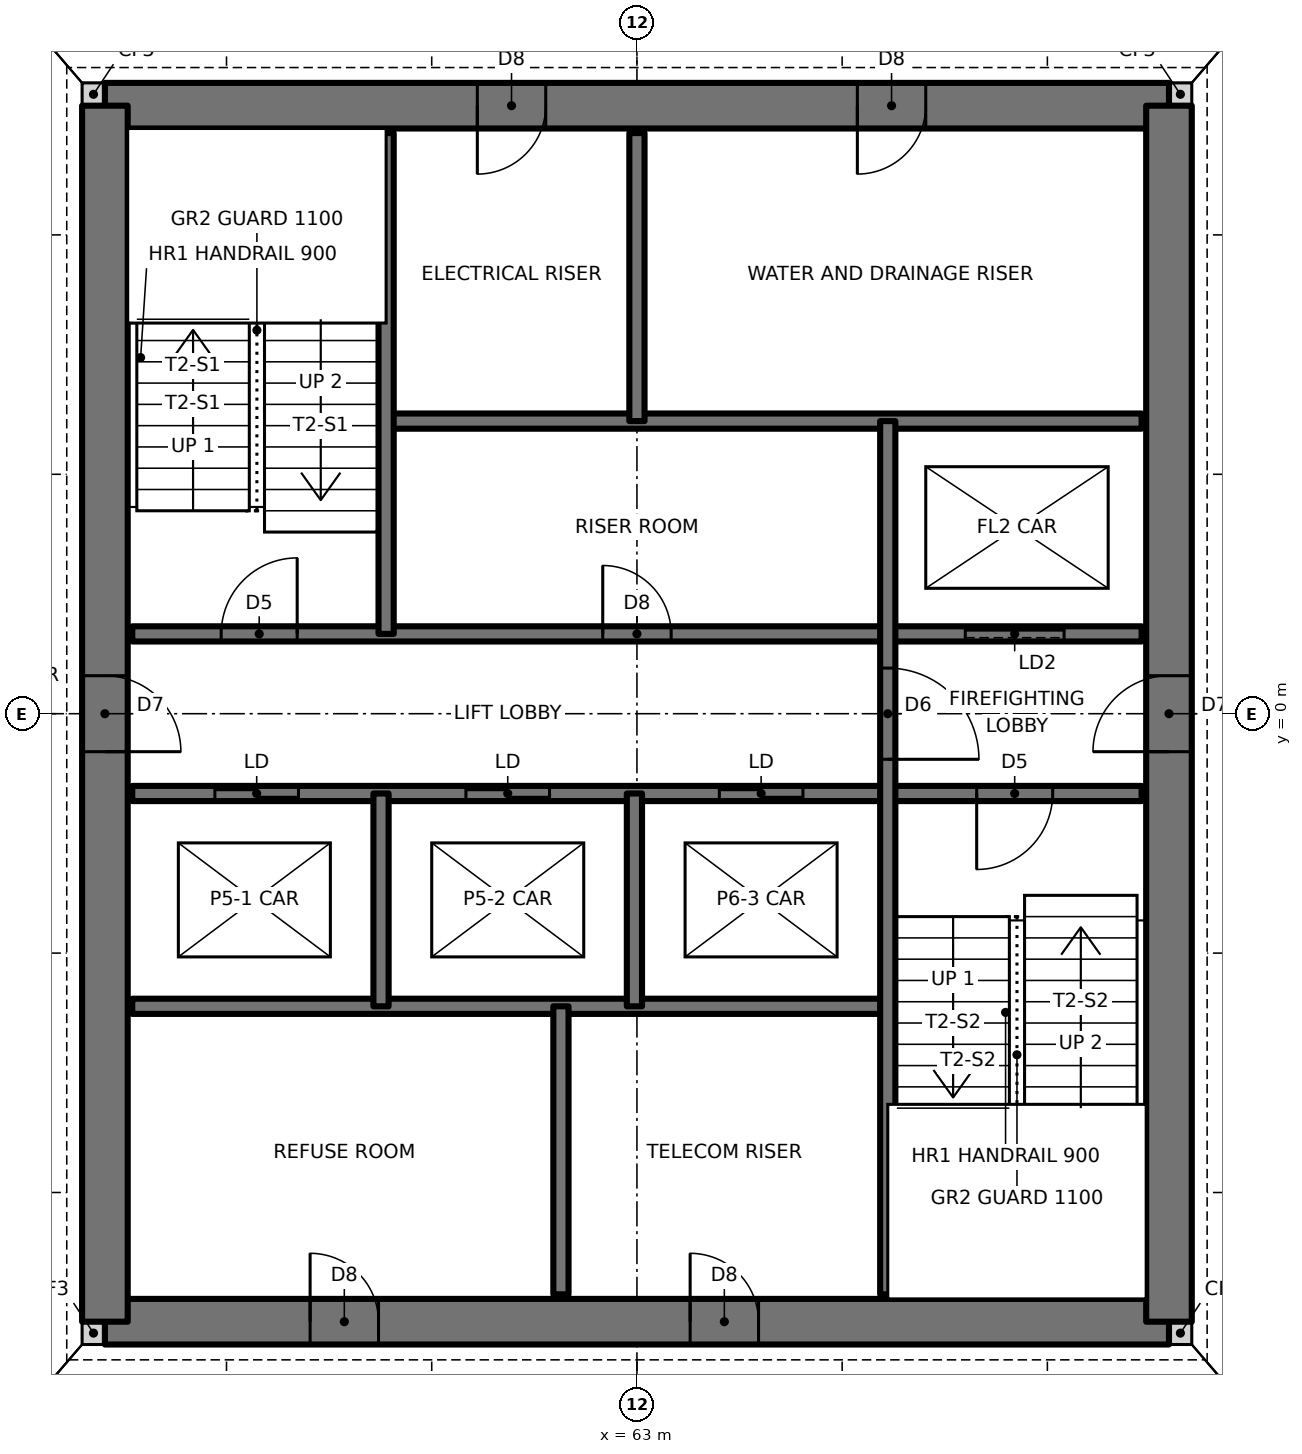
"""IFC4 building model, lengths in metres.
Left out: names, types, materials, properties, quantities, classifications, styles, units other than length and angle.
Written with IfcOpenShell. Run it as: python <this file> out.ifc"""

import sys

from ifc_helpers import new_model, si_unit, direction, frame, frame_2d, origin, place, context, subcontext, project, spatial, rectangle, extrude, element, fill, save


model = new_model("IFC4")
c1 = context("Model", 3, precision=1e-05, world=origin(), true_north=direction((0.0, 1.0)))
c2 = subcontext(c1, "Body", "Model", "MODEL_VIEW")
j1 = project(units=[si_unit("LENGTHUNIT", "METRE"), si_unit("PLANEANGLEUNIT", "RADIAN")], contexts=[c1])
p1 = place(None, origin())
s1 = spatial("IfcSite", under=j1, at=p1, CompositionType="ELEMENT")
p2 = place(p1, origin())
s2 = spatial("IfcBuilding", under=s1, at=p2, CompositionType="ELEMENT")
p3 = place(p2, frame((0.0, 0.0, 50.0)))
s3 = spatial("IfcBuildingStorey", under=s2, at=p3, CompositionType="ELEMENT", Elevation=50.0)
for number, where, z_axis, x_axis in (
    (1, (55.7, -8.15, 0.0), (0.0, 0.0, 1.0), (1.0, 0.0, 0.0)),
    (2, (70.0, -8.15, 0.0), (0.0, 0.0, 1.0), (1.0, 0.0, 0.0)),
    (3, (70.0, 8.15, 0.0), (0.0, 0.0, 1.0), (1.0, 0.0, 0.0)),
    (4, (55.7, 8.15, 0.0), (0.0, 0.0, 1.0), (1.0, 0.0, 0.0)),
):
    element("IfcWall", number, at=place(p3, frame(where, z_axis=z_axis, x_axis=x_axis)), inside=s3, PredefinedType="SOLIDWALL", context=c2, shape_type="SweptSolid", body=[
        extrude(rectangle(XDim=0.3, YDim=0.3, at=frame_2d((0.15, 0.0))), origin(), (0.0, 0.0, 1.0), 3.5),
    ])
p4 = place(p3, frame((56.0, -8.0, 0.0), z_axis=(0.0, 0.0, 1.0), x_axis=(1.0, 0.0, 0.0)))
e5 = element("IfcWall", 5, at=p4, inside=s3, PredefinedType="SHEAR", context=c2, shape_type="SweptSolid", body=[
    extrude(rectangle(XDim=14.0, YDim=0.6, at=frame_2d((7.0, 0.0))), origin(), (0.0, 0.0, 1.0), 3.5),
])
p5 = place(p4, frame((2.7, 0.0, 0.0)))
e6 = element("IfcOpeningElement", 6, at=p5, cuts=e5, PredefinedType="OPENING", context=c2, shape_type="SweptSolid", body=[
    extrude(rectangle(XDim=0.9, YDim=2.1, at=frame_2d((0.45, 1.05))), frame((0.0, 0.31, 0.0), z_axis=(0.0, -1.0, 0.0), x_axis=(1.0, 0.0, 0.0)), (0.0, 0.0, 1.0), 0.62),
])
p6 = place(p4, frame((7.7, 0.0, 0.0)))
e7 = element("IfcOpeningElement", 7, at=p6, cuts=e5, PredefinedType="OPENING", context=c2, shape_type="SweptSolid", body=[
    extrude(rectangle(XDim=0.9, YDim=2.1, at=frame_2d((0.45, 1.05))), frame((0.0, 0.31, 0.0), z_axis=(0.0, -1.0, 0.0), x_axis=(1.0, 0.0, 0.0)), (0.0, 0.0, 1.0), 0.62),
])
p7 = place(p3, frame((70.0, 8.0, 0.0), z_axis=(0.0, 0.0, 1.0), x_axis=(-1.0, 0.0, 0.0)))
e8 = element("IfcWall", 8, at=p7, inside=s3, PredefinedType="SHEAR", context=c2, shape_type="SweptSolid", body=[
    extrude(rectangle(XDim=14.0, YDim=0.6, at=frame_2d((7.0, 0.0))), origin(), (0.0, 0.0, 1.0), 3.5),
])
p8 = place(p7, frame((8.2, 0.0, 0.0)))
e9 = element("IfcOpeningElement", 9, at=p8, cuts=e8, PredefinedType="OPENING", context=c2, shape_type="SweptSolid", body=[
    extrude(rectangle(XDim=0.9, YDim=2.1, at=frame_2d((0.45, 1.05))), frame((0.0, 0.31, 0.0), z_axis=(0.0, -1.0, 0.0), x_axis=(1.0, 0.0, 0.0)), (0.0, 0.0, 1.0), 0.62),
])
p9 = place(p7, frame((3.2, 0.0, 0.0)))
e10 = element("IfcOpeningElement", 10, at=p9, cuts=e8, PredefinedType="OPENING", context=c2, shape_type="SweptSolid", body=[
    extrude(rectangle(XDim=0.9, YDim=2.1, at=frame_2d((0.45, 1.05))), frame((0.0, 0.31, 0.0), z_axis=(0.0, -1.0, 0.0), x_axis=(1.0, 0.0, 0.0)), (0.0, 0.0, 1.0), 0.62),
])
p10 = place(p3, frame((70.0, -8.0, 0.0), z_axis=(0.0, 0.0, 1.0), x_axis=(0.0, 1.0, 0.0)))
e11 = element("IfcWall", 11, at=p10, inside=s3, PredefinedType="SHEAR", context=c2, shape_type="SweptSolid", body=[
    extrude(rectangle(XDim=16.0, YDim=0.6, at=frame_2d((8.0, 0.0))), origin(), (0.0, 0.0, 1.0), 3.5),
])
p11 = place(p10, frame((7.5, 0.0, 0.0)))
e12 = element("IfcOpeningElement", 12, at=p11, cuts=e11, PredefinedType="OPENING", context=c2, shape_type="SweptSolid", body=[
    extrude(rectangle(XDim=1.0, YDim=2.1, at=frame_2d((0.5, 1.05))), frame((0.0, 0.31, 0.0), z_axis=(0.0, -1.0, 0.0), x_axis=(1.0, 0.0, 0.0)), (0.0, 0.0, 1.0), 0.62),
])
p12 = place(p3, frame((56.0, 8.0, 0.0), z_axis=(0.0, 0.0, 1.0), x_axis=(0.0, -1.0, 0.0)))
e13 = element("IfcWall", 13, at=p12, inside=s3, PredefinedType="SHEAR", context=c2, shape_type="SweptSolid", body=[
    extrude(rectangle(XDim=16.0, YDim=0.6, at=frame_2d((8.0, 0.0))), origin(), (0.0, 0.0, 1.0), 3.5),
])
p13 = place(p12, frame((7.5, 0.0, 0.0)))
e14 = element("IfcOpeningElement", 14, at=p13, cuts=e13, PredefinedType="OPENING", context=c2, shape_type="SweptSolid", body=[
    extrude(rectangle(XDim=1.0, YDim=2.1, at=frame_2d((0.5, 1.05))), frame((0.0, 0.31, 0.0), z_axis=(0.0, -1.0, 0.0), x_axis=(1.0, 0.0, 0.0)), (0.0, 0.0, 1.0), 0.62),
])
p14 = place(p3, frame((56.36, -3.85, 0.0), z_axis=(0.0, 0.0, 1.0), x_axis=(1.0, 0.0, 0.0)))
e15 = element("IfcWall", 15, at=p14, inside=s3, PredefinedType="SOLIDWALL", context=c2, shape_type="SweptSolid", body=[
    extrude(rectangle(XDim=9.94, YDim=0.2, at=frame_2d((4.97, 0.0))), origin(), (0.0, 0.0, 1.0), 3.5),
])
p15 = place(p3, frame((56.36, -1.05, 0.0), z_axis=(0.0, 0.0, 1.0), x_axis=(1.0, 0.0, 0.0)))
e16 = element("IfcWall", 16, at=p15, inside=s3, PredefinedType="SOLIDWALL", context=c2, shape_type="SweptSolid", body=[
    extrude(rectangle(XDim=13.28, YDim=0.2, at=frame_2d((6.64, 0.0))), origin(), (0.0, 0.0, 1.0), 3.5),
])
p16 = place(p15, frame((11.11, 0.0, 0.0)))
e17 = element("IfcOpeningElement", 17, at=p16, cuts=e16, PredefinedType="OPENING", context=c2, shape_type="SweptSolid", body=[
    extrude(rectangle(XDim=1.0, YDim=2.1, at=frame_2d((0.5, 1.05))), frame((0.0, 0.11, 0.0), z_axis=(0.0, -1.0, 0.0), x_axis=(1.0, 0.0, 0.0)), (0.0, 0.0, 1.0), 0.22),
])
p17 = place(p15, frame((1.087, 0.0, 0.0)))
e18 = element("IfcOpeningElement", 18, at=p17, cuts=e16, PredefinedType="OPENING", context=c2, shape_type="SweptSolid", body=[
    extrude(rectangle(XDim=1.1, YDim=2.1, at=frame_2d((0.55, 1.05))), frame((0.0, 0.11, 0.0), z_axis=(0.0, -1.0, 0.0), x_axis=(1.0, 0.0, 0.0)), (0.0, 0.0, 1.0), 0.22),
])
p18 = place(p15, frame((4.39, 0.0, 0.0)))
e19 = element("IfcOpeningElement", 19, at=p18, cuts=e16, PredefinedType="OPENING", context=c2, shape_type="SweptSolid", body=[
    extrude(rectangle(XDim=1.1, YDim=2.1, at=frame_2d((0.55, 1.05))), frame((0.0, 0.11, 0.0), z_axis=(0.0, -1.0, 0.0), x_axis=(1.0, 0.0, 0.0)), (0.0, 0.0, 1.0), 0.22),
])
p19 = place(p15, frame((7.724, 0.0, 0.0)))
e20 = element("IfcOpeningElement", 20, at=p19, cuts=e16, PredefinedType="OPENING", context=c2, shape_type="SweptSolid", body=[
    extrude(rectangle(XDim=1.1, YDim=2.1, at=frame_2d((0.55, 1.05))), frame((0.0, 0.11, 0.0), z_axis=(0.0, -1.0, 0.0), x_axis=(1.0, 0.0, 0.0)), (0.0, 0.0, 1.0), 0.22),
])
p20 = place(p3, frame((56.36, 1.05, 0.0), z_axis=(0.0, 0.0, 1.0), x_axis=(1.0, 0.0, 0.0)))
e21 = element("IfcWall", 21, at=p20, inside=s3, PredefinedType="SOLIDWALL", context=c2, shape_type="SweptSolid", body=[
    extrude(rectangle(XDim=13.28, YDim=0.2, at=frame_2d((6.64, 0.0))), origin(), (0.0, 0.0, 1.0), 3.5),
])
p21 = place(p20, frame((1.17, 0.0, 0.0)))
e22 = element("IfcOpeningElement", 22, at=p21, cuts=e21, PredefinedType="OPENING", context=c2, shape_type="SweptSolid", body=[
    extrude(rectangle(XDim=1.0, YDim=2.1, at=frame_2d((0.5, 1.05))), frame((0.0, 0.11, 0.0), z_axis=(0.0, -1.0, 0.0), x_axis=(1.0, 0.0, 0.0)), (0.0, 0.0, 1.0), 0.22),
])
p22 = place(p20, frame((6.19, 0.0, 0.0)))
e23 = element("IfcOpeningElement", 23, at=p22, cuts=e21, PredefinedType="OPENING", context=c2, shape_type="SweptSolid", body=[
    extrude(rectangle(XDim=0.9, YDim=2.1, at=frame_2d((0.45, 1.05))), frame((0.0, 0.11, 0.0), z_axis=(0.0, -1.0, 0.0), x_axis=(1.0, 0.0, 0.0)), (0.0, 0.0, 1.0), 0.22),
])
p23 = place(p20, frame((10.96, 0.0, 0.0)))
e24 = element("IfcOpeningElement", 24, at=p23, cuts=e21, PredefinedType="OPENING", context=c2, shape_type="SweptSolid", body=[
    extrude(rectangle(XDim=1.3, YDim=2.1, at=frame_2d((0.65, 1.05))), frame((0.0, 0.11, 0.0), z_axis=(0.0, -1.0, 0.0), x_axis=(1.0, 0.0, 0.0)), (0.0, 0.0, 1.0), 0.22),
])
p24 = place(p3, frame((59.7, 3.85, 0.0), z_axis=(0.0, 0.0, 1.0), x_axis=(1.0, 0.0, 0.0)))
e25 = element("IfcWall", 25, at=p24, inside=s3, PredefinedType="SOLIDWALL", context=c2, shape_type="SweptSolid", body=[
    extrude(rectangle(XDim=9.94, YDim=0.2, at=frame_2d((4.97, 0.0))), origin(), (0.0, 0.0, 1.0), 3.5),
])
p25 = place(p3, frame((66.3, -7.64, 0.0), z_axis=(0.0, 0.0, 1.0), x_axis=(0.0, 1.0, 0.0)))
e26 = element("IfcWall", 26, at=p25, inside=s3, PredefinedType="SOLIDWALL", context=c2, shape_type="SweptSolid", body=[
    extrude(rectangle(XDim=11.49, YDim=0.2, at=frame_2d((5.745, 0.0))), origin(), (0.0, 0.0, 1.0), 3.5),
])
p26 = place(p25, frame((7.04, 0.0, 0.0)))
e27 = element("IfcOpeningElement", 27, at=p26, cuts=e26, PredefinedType="OPENING", context=c2, shape_type="SweptSolid", body=[
    extrude(rectangle(XDim=1.2, YDim=2.1, at=frame_2d((0.6, 1.05))), frame((0.0, 0.11, 0.0), z_axis=(0.0, -1.0, 0.0), x_axis=(1.0, 0.0, 0.0)), (0.0, 0.0, 1.0), 0.22),
])
p27 = place(p3, frame((63.0, 3.85, 0.0), z_axis=(0.0, 0.0, 1.0), x_axis=(0.0, 1.0, 0.0)))
e28 = element("IfcWall", 28, at=p27, inside=s3, PredefinedType="SOLIDWALL", context=c2, shape_type="SweptSolid", body=[
    extrude(rectangle(XDim=3.79, YDim=0.2, at=frame_2d((1.895, 0.0))), origin(), (0.0, 0.0, 1.0), 3.5),
])
p28 = place(p3, frame((62.967, -3.85, 0.0), z_axis=(0.0, 0.0, 1.0), x_axis=(0.0, 1.0, 0.0)))
e29 = element("IfcWall", 29, at=p28, inside=s3, PredefinedType="SOLIDWALL", context=c2, shape_type="SweptSolid", body=[
    extrude(rectangle(XDim=2.8, YDim=0.2, at=frame_2d((1.4, 0.0))), origin(), (0.0, 0.0, 1.0), 3.5),
])
p29 = place(p3, frame((62.0, -7.64, 0.0), z_axis=(0.0, 0.0, 1.0), x_axis=(0.0, 1.0, 0.0)))
e30 = element("IfcWall", 30, at=p29, inside=s3, PredefinedType="SOLIDWALL", context=c2, shape_type="SweptSolid", body=[
    extrude(rectangle(XDim=3.79, YDim=0.2, at=frame_2d((1.895, 0.0))), origin(), (0.0, 0.0, 1.0), 3.5),
])
p30 = place(p3, frame((59.7, 1.05, 0.0), z_axis=(0.0, 0.0, 1.0), x_axis=(0.0, 1.0, 0.0)))
e31 = element("IfcWall", 31, at=p30, inside=s3, PredefinedType="SOLIDWALL", context=c2, shape_type="SweptSolid", body=[
    extrude(rectangle(XDim=6.59, YDim=0.2, at=frame_2d((3.295, 0.0))), origin(), (0.0, 0.0, 1.0), 3.5),
])
p31 = place(p3, frame((59.633, -3.85, 0.0), z_axis=(0.0, 0.0, 1.0), x_axis=(0.0, 1.0, 0.0)))
e32 = element("IfcWall", 32, at=p31, inside=s3, PredefinedType="SOLIDWALL", context=c2, shape_type="SweptSolid", body=[
    extrude(rectangle(XDim=2.8, YDim=0.2, at=frame_2d((1.4, 0.0))), origin(), (0.0, 0.0, 1.0), 3.5),
])
p32 = place(p21, origin())
e33 = element("IfcDoor", 33, at=p32, inside=s3, OperationType="SINGLE_SWING_RIGHT", PredefinedType="DOOR", context=c2, shape_type="SweptSolid", body=[
    extrude(rectangle(XDim=1.0, YDim=2.1, at=frame_2d((0.5, 1.05))), frame((0.0, 0.025, 0.0), z_axis=(0.0, -1.0, 0.0), x_axis=(1.0, 0.0, 0.0)), (0.0, 0.0, 1.0), 0.05),
])
fill(e22, e33)
p33 = place(p16, frame((1.0, 0.0, 0.0), z_axis=(0.0, 0.0, 1.0), x_axis=(-1.0, 0.0, 0.0)))
e34 = element("IfcDoor", 34, at=p33, inside=s3, OperationType="SINGLE_SWING_RIGHT", PredefinedType="DOOR", context=c2, shape_type="SweptSolid", body=[
    extrude(rectangle(XDim=1.0, YDim=2.1, at=frame_2d((0.5, 1.05))), frame((0.0, 0.025, 0.0), z_axis=(0.0, -1.0, 0.0), x_axis=(1.0, 0.0, 0.0)), (0.0, 0.0, 1.0), 0.05),
])
fill(e17, e34)
p34 = place(p26, frame((1.2, 0.0, 0.0), z_axis=(0.0, 0.0, 1.0), x_axis=(-1.0, 0.0, 0.0)))
e35 = element("IfcDoor", 35, at=p34, inside=s3, OperationType="SINGLE_SWING_RIGHT", PredefinedType="DOOR", context=c2, shape_type="SweptSolid", body=[
    extrude(rectangle(XDim=1.2, YDim=2.1, at=frame_2d((0.6, 1.05))), frame((0.0, 0.025, 0.0), z_axis=(0.0, -1.0, 0.0), x_axis=(1.0, 0.0, 0.0)), (0.0, 0.0, 1.0), 0.05),
])
fill(e27, e35)
p35 = place(p22, origin())
e36 = element("IfcDoor", 36, at=p35, inside=s3, OperationType="SINGLE_SWING_LEFT", PredefinedType="DOOR", context=c2, shape_type="SweptSolid", body=[
    extrude(rectangle(XDim=0.9, YDim=2.1, at=frame_2d((0.45, 1.05))), frame((0.0, 0.025, 0.0), z_axis=(0.0, -1.0, 0.0), x_axis=(1.0, 0.0, 0.0)), (0.0, 0.0, 1.0), 0.05),
])
fill(e23, e36)
p36 = place(p13, origin())
e37 = element("IfcDoor", 37, at=p36, inside=s3, OperationType="SINGLE_SWING_RIGHT", PredefinedType="DOOR", context=c2, shape_type="SweptSolid", body=[
    extrude(rectangle(XDim=1.0, YDim=2.1, at=frame_2d((0.5, 1.05))), frame((0.0, 0.025, 0.0), z_axis=(0.0, -1.0, 0.0), x_axis=(1.0, 0.0, 0.0)), (0.0, 0.0, 1.0), 0.05),
])
fill(e14, e37)
p37 = place(p11, origin())
e38 = element("IfcDoor", 38, at=p37, inside=s3, OperationType="SINGLE_SWING_LEFT", PredefinedType="DOOR", context=c2, shape_type="SweptSolid", body=[
    extrude(rectangle(XDim=1.0, YDim=2.1, at=frame_2d((0.5, 1.05))), frame((0.0, 0.025, 0.0), z_axis=(0.0, -1.0, 0.0), x_axis=(1.0, 0.0, 0.0)), (0.0, 0.0, 1.0), 0.05),
])
fill(e12, e38)
p38 = place(p8, origin())
e39 = element("IfcDoor", 39, at=p38, inside=s3, OperationType="SINGLE_SWING_RIGHT", PredefinedType="DOOR", context=c2, shape_type="SweptSolid", body=[
    extrude(rectangle(XDim=0.9, YDim=2.1, at=frame_2d((0.45, 1.05))), frame((0.0, 0.025, 0.0), z_axis=(0.0, -1.0, 0.0), x_axis=(1.0, 0.0, 0.0)), (0.0, 0.0, 1.0), 0.05),
])
fill(e9, e39)
p39 = place(p9, origin())
e40 = element("IfcDoor", 40, at=p39, inside=s3, OperationType="SINGLE_SWING_RIGHT", PredefinedType="DOOR", context=c2, shape_type="SweptSolid", body=[
    extrude(rectangle(XDim=0.9, YDim=2.1, at=frame_2d((0.45, 1.05))), frame((0.0, 0.025, 0.0), z_axis=(0.0, -1.0, 0.0), x_axis=(1.0, 0.0, 0.0)), (0.0, 0.0, 1.0), 0.05),
])
fill(e10, e40)
p40 = place(p5, origin())
e41 = element("IfcDoor", 41, at=p40, inside=s3, OperationType="SINGLE_SWING_LEFT", PredefinedType="DOOR", context=c2, shape_type="SweptSolid", body=[
    extrude(rectangle(XDim=0.9, YDim=2.1, at=frame_2d((0.45, 1.05))), frame((0.0, 0.025, 0.0), z_axis=(0.0, -1.0, 0.0), x_axis=(1.0, 0.0, 0.0)), (0.0, 0.0, 1.0), 0.05),
])
fill(e6, e41)
p41 = place(p6, origin())
e42 = element("IfcDoor", 42, at=p41, inside=s3, OperationType="SINGLE_SWING_LEFT", PredefinedType="DOOR", context=c2, shape_type="SweptSolid", body=[
    extrude(rectangle(XDim=0.9, YDim=2.1, at=frame_2d((0.45, 1.05))), frame((0.0, 0.025, 0.0), z_axis=(0.0, -1.0, 0.0), x_axis=(1.0, 0.0, 0.0)), (0.0, 0.0, 1.0), 0.05),
])
fill(e7, e42)
p42 = place(p17, origin())
e43 = element("IfcDoor", 43, at=p42, inside=s3, OperationType="DOUBLE_DOOR_SLIDING", PredefinedType="DOOR", context=c2, shape_type="SweptSolid", body=[
    extrude(rectangle(XDim=1.1, YDim=2.1, at=frame_2d((0.55, 1.05))), frame((0.0, 0.025, 0.0), z_axis=(0.0, -1.0, 0.0), x_axis=(1.0, 0.0, 0.0)), (0.0, 0.0, 1.0), 0.05),
])
fill(e18, e43)
p43 = place(p18, origin())
e44 = element("IfcDoor", 44, at=p43, inside=s3, OperationType="DOUBLE_DOOR_SLIDING", PredefinedType="DOOR", context=c2, shape_type="SweptSolid", body=[
    extrude(rectangle(XDim=1.1, YDim=2.1, at=frame_2d((0.55, 1.05))), frame((0.0, 0.025, 0.0), z_axis=(0.0, -1.0, 0.0), x_axis=(1.0, 0.0, 0.0)), (0.0, 0.0, 1.0), 0.05),
])
fill(e19, e44)
p44 = place(p19, origin())
e45 = element("IfcDoor", 45, at=p44, inside=s3, OperationType="DOUBLE_DOOR_SLIDING", PredefinedType="DOOR", context=c2, shape_type="SweptSolid", body=[
    extrude(rectangle(XDim=1.1, YDim=2.1, at=frame_2d((0.55, 1.05))), frame((0.0, 0.025, 0.0), z_axis=(0.0, -1.0, 0.0), x_axis=(1.0, 0.0, 0.0)), (0.0, 0.0, 1.0), 0.05),
])
fill(e20, e45)
p45 = place(p23, origin())
e46 = element("IfcDoor", 46, at=p45, inside=s3, OperationType="SLIDING_TO_LEFT", PredefinedType="DOOR", context=c2, shape_type="SweptSolid", body=[
    extrude(rectangle(XDim=1.3, YDim=2.1, at=frame_2d((0.65, 1.05))), frame((0.0, 0.025, 0.0), z_axis=(0.0, -1.0, 0.0), x_axis=(1.0, 0.0, 0.0)), (0.0, 0.0, 1.0), 0.05),
])
fill(e24, e46)
save(model, sys.argv[1])
